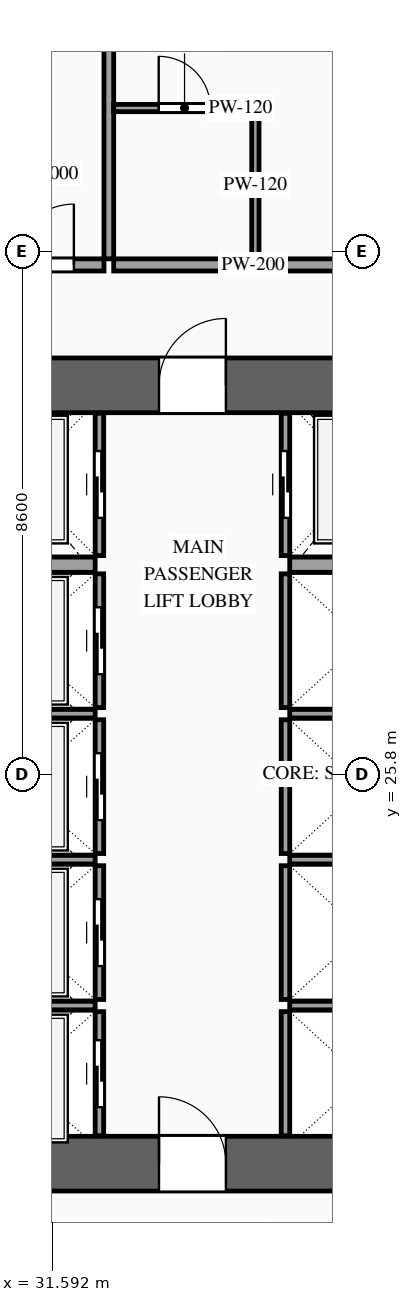
"""IFC4 building model, lengths in metres.
Left out: names, types, materials, properties, quantities, classifications, styles, units other than length and angle.
Written with IfcOpenShell. Run it as: python <this file> out.ifc"""

import sys

from ifc_helpers import new_model, si_unit, direction, frame, frame_2d, origin, place, context, subcontext, project, spatial, rectangle, extrude, source, transform, mapped, element, fill, save


model = new_model("IFC4")
c1 = context("Model", 3, precision=1e-05, world=origin(), true_north=direction((0.0, 1.0)))
c2 = subcontext(c1, "Body", "Model", "MODEL_VIEW")
j1 = project(units=[si_unit("LENGTHUNIT", "METRE"), si_unit("PLANEANGLEUNIT", "RADIAN")], contexts=[c1])
p1 = place(None, origin())
s1 = spatial("IfcSite", under=j1, at=p1, CompositionType="ELEMENT")
p2 = place(p1, origin())
s2 = spatial("IfcBuilding", under=s1, at=p2, CompositionType="ELEMENT")
p3 = place(p2, frame((0.0, 0.0, 46.0)))
s3 = spatial("IfcBuildingStorey", under=s2, at=p3, CompositionType="ELEMENT", Elevation=46.0)
p4 = place(p3, frame((23.35, 19.4, 0.0), z_axis=(0.0, 0.0, 1.0), x_axis=(1.0, 0.0, 0.0)))
e1 = element("IfcWall", 1, at=p4, inside=s3, PredefinedType="SHEAR", context=c2, shape_type="SweptSolid", body=[
    extrude(rectangle(XDim=27.3, YDim=0.9, at=frame_2d((13.65, 0.0))), origin(), (0.0, 0.0, 1.0), 3.6),
])
p5 = place(p4, frame((2.1, 0.0, 0.0)))
e2 = element("IfcOpeningElement", 2, at=p5, cuts=e1, PredefinedType="OPENING", context=c2, shape_type="SweptSolid", body=[
    extrude(rectangle(XDim=1.1, YDim=2.2, at=frame_2d((0.55, 1.1))), frame((0.0, 0.465, 0.0), z_axis=(0.0, -1.0, 0.0), x_axis=(1.0, 0.0, 0.0)), (0.0, 0.0, 1.0), 0.93),
])
p6 = place(p4, frame((10.0, 0.0, 0.0)))
e3 = element("IfcOpeningElement", 3, at=p6, cuts=e1, PredefinedType="OPENING", context=c2, shape_type="SweptSolid", body=[
    extrude(rectangle(XDim=1.1, YDim=2.2, at=frame_2d((0.55, 1.1))), frame((0.0, 0.465, 0.0), z_axis=(0.0, -1.0, 0.0), x_axis=(1.0, 0.0, 0.0)), (0.0, 0.0, 1.0), 0.93),
])
p7 = place(p4, frame((23.2, 0.0, 0.0)))
e4 = element("IfcOpeningElement", 4, at=p7, cuts=e1, PredefinedType="OPENING", context=c2, shape_type="SweptSolid", body=[
    extrude(rectangle(XDim=1.1, YDim=2.2, at=frame_2d((0.55, 1.1))), frame((0.0, 0.465, 0.0), z_axis=(0.0, -1.0, 0.0), x_axis=(1.0, 0.0, 0.0)), (0.0, 0.0, 1.0), 0.93),
])
p8 = place(p4, frame((19.82, 0.0, 0.0)))
e5 = element("IfcOpeningElement", 5, at=p8, cuts=e1, PredefinedType="OPENING", context=c2, shape_type="SweptSolid", body=[
    extrude(rectangle(XDim=0.9, YDim=2.15, at=frame_2d((0.45, 1.075))), frame((0.0, 0.465, 0.0), z_axis=(0.0, -1.0, 0.0), x_axis=(1.0, 0.0, 0.0)), (0.0, 0.0, 1.0), 0.93),
])
p9 = place(p4, frame((18.38, 0.0, 0.0)))
e6 = element("IfcOpeningElement", 6, at=p9, cuts=e1, PredefinedType="OPENING", context=c2, shape_type="SweptSolid", body=[
    extrude(rectangle(XDim=0.9, YDim=2.15, at=frame_2d((0.45, 1.075))), frame((0.0, 0.465, 0.0), z_axis=(0.0, -1.0, 0.0), x_axis=(1.0, 0.0, 0.0)), (0.0, 0.0, 1.0), 0.93),
])
p10 = place(p3, frame((23.35, 32.2, 0.0), z_axis=(0.0, 0.0, 1.0), x_axis=(1.0, 0.0, 0.0)))
e7 = element("IfcWall", 7, at=p10, inside=s3, PredefinedType="SHEAR", context=c2, shape_type="SweptSolid", body=[
    extrude(rectangle(XDim=27.3, YDim=0.9, at=frame_2d((13.65, 0.0))), origin(), (0.0, 0.0, 1.0), 3.6),
])
p11 = place(p10, frame((4.72, 0.0, 0.0)))
e8 = element("IfcOpeningElement", 8, at=p11, cuts=e7, PredefinedType="OPENING", context=c2, shape_type="SweptSolid", body=[
    extrude(rectangle(XDim=0.9, YDim=2.15, at=frame_2d((0.45, 1.075))), frame((0.0, 0.465, 0.0), z_axis=(0.0, -1.0, 0.0), x_axis=(1.0, 0.0, 0.0)), (0.0, 0.0, 1.0), 0.93),
])
p12 = place(p10, frame((10.0, 0.0, 0.0)))
e9 = element("IfcOpeningElement", 9, at=p12, cuts=e7, PredefinedType="OPENING", context=c2, shape_type="SweptSolid", body=[
    extrude(rectangle(XDim=1.1, YDim=2.2, at=frame_2d((0.55, 1.1))), frame((0.0, 0.465, 0.0), z_axis=(0.0, -1.0, 0.0), x_axis=(1.0, 0.0, 0.0)), (0.0, 0.0, 1.0), 0.93),
])
p13 = place(p10, frame((15.85, 0.0, 0.0)))
e10 = element("IfcOpeningElement", 10, at=p13, cuts=e7, PredefinedType="OPENING", context=c2, shape_type="SweptSolid", body=[
    extrude(rectangle(XDim=1.1, YDim=2.2, at=frame_2d((0.55, 1.1))), frame((0.0, 0.465, 0.0), z_axis=(0.0, -1.0, 0.0), x_axis=(1.0, 0.0, 0.0)), (0.0, 0.0, 1.0), 0.93),
])
p14 = place(p10, frame((19.05, 0.0, 0.0)))
e11 = element("IfcOpeningElement", 11, at=p14, cuts=e7, PredefinedType="OPENING", context=c2, shape_type="SweptSolid", body=[
    extrude(rectangle(XDim=0.9, YDim=2.15, at=frame_2d((0.45, 1.075))), frame((0.0, 0.465, 0.0), z_axis=(0.0, -1.0, 0.0), x_axis=(1.0, 0.0, 0.0)), (0.0, 0.0, 1.0), 0.93),
])
p15 = place(p3, frame((32.37, 19.86, 0.0), z_axis=(0.0, 0.0, 1.0), x_axis=(0.0, 1.0, 0.0)))
e12 = element("IfcWall", 12, at=p15, inside=s3, PredefinedType="SOLIDWALL", context=c2, shape_type="SweptSolid", body=[
    extrude(rectangle(XDim=2.04, YDim=0.14, at=frame_2d((1.02, 0.0))), origin(), (0.0, 0.0, 1.0), 3.38),
])
p16 = place(p15, frame((0.47, 0.0, 0.0)))
e13 = element("IfcOpeningElement", 13, at=p16, cuts=e12, PredefinedType="OPENING", context=c2, shape_type="SweptSolid", body=[
    extrude(rectangle(XDim=1.1, YDim=2.2, at=frame_2d((0.55, 1.1))), frame((0.0, 0.085, 0.0), z_axis=(0.0, -1.0, 0.0), x_axis=(1.0, 0.0, 0.0)), (0.0, 0.0, 1.0), 0.17),
])
m1 = source(origin(), c2, "Body", "SweptSolid", [
    extrude(rectangle(XDim=2.5, YDim=0.14, at=frame_2d((1.25, 0.0))), origin(), (0.0, 0.0, 1.0), 3.38),
])
p17 = place(p3, frame((29.8, 22.0, 0.0), z_axis=(0.0, 0.0, 1.0), x_axis=(1.0, 0.0, 0.0)))
e14 = element("IfcWall", 14, at=p17, inside=s3, PredefinedType="SOLIDWALL", context=c2, shape_type="MappedRepresentation", body=[
    mapped(m1, transform((0.0, 0.0, 0.0), scale=1.0)),
])
p18 = place(p3, frame((32.37, 22.1, 0.0), z_axis=(0.0, 0.0, 1.0), x_axis=(0.0, 1.0, 0.0)))
e15 = element("IfcWall", 15, at=p18, inside=s3, PredefinedType="SOLIDWALL", context=c2, shape_type="SweptSolid", body=[
    extrude(rectangle(XDim=2.2, YDim=0.14, at=frame_2d((1.1, 0.0))), origin(), (0.0, 0.0, 1.0), 3.38),
])
p19 = place(p18, frame((0.55, 0.0, 0.0)))
e16 = element("IfcOpeningElement", 16, at=p19, cuts=e15, PredefinedType="OPENING", context=c2, shape_type="SweptSolid", body=[
    extrude(rectangle(XDim=1.1, YDim=2.2, at=frame_2d((0.55, 1.1))), frame((0.0, 0.085, 0.0), z_axis=(0.0, -1.0, 0.0), x_axis=(1.0, 0.0, 0.0)), (0.0, 0.0, 1.0), 0.17),
])
p20 = place(p3, frame((29.8, 24.4, 0.0), z_axis=(0.0, 0.0, 1.0), x_axis=(1.0, 0.0, 0.0)))
e17 = element("IfcWall", 17, at=p20, inside=s3, PredefinedType="SOLIDWALL", context=c2, shape_type="MappedRepresentation", body=[
    mapped(m1, transform((0.0, 0.0, 0.0), scale=1.0)),
])
p21 = place(p3, frame((32.37, 24.5, 0.0), z_axis=(0.0, 0.0, 1.0), x_axis=(0.0, 1.0, 0.0)))
e18 = element("IfcWall", 18, at=p21, inside=s3, PredefinedType="SOLIDWALL", context=c2, shape_type="SweptSolid", body=[
    extrude(rectangle(XDim=2.2, YDim=0.14, at=frame_2d((1.1, 0.0))), origin(), (0.0, 0.0, 1.0), 3.38),
])
p22 = place(p21, frame((0.55, 0.0, 0.0)))
e19 = element("IfcOpeningElement", 19, at=p22, cuts=e18, PredefinedType="OPENING", context=c2, shape_type="SweptSolid", body=[
    extrude(rectangle(XDim=1.1, YDim=2.2, at=frame_2d((0.55, 1.1))), frame((0.0, 0.085, 0.0), z_axis=(0.0, -1.0, 0.0), x_axis=(1.0, 0.0, 0.0)), (0.0, 0.0, 1.0), 0.17),
])
p23 = place(p3, frame((29.8, 26.8, 0.0), z_axis=(0.0, 0.0, 1.0), x_axis=(1.0, 0.0, 0.0)))
e20 = element("IfcWall", 20, at=p23, inside=s3, PredefinedType="SOLIDWALL", context=c2, shape_type="MappedRepresentation", body=[
    mapped(m1, transform((0.0, 0.0, 0.0), scale=1.0)),
])
p24 = place(p3, frame((32.37, 26.9, 0.0), z_axis=(0.0, 0.0, 1.0), x_axis=(0.0, 1.0, 0.0)))
e21 = element("IfcWall", 21, at=p24, inside=s3, PredefinedType="SOLIDWALL", context=c2, shape_type="SweptSolid", body=[
    extrude(rectangle(XDim=2.2, YDim=0.14, at=frame_2d((1.1, 0.0))), origin(), (0.0, 0.0, 1.0), 3.38),
])
p25 = place(p24, frame((0.55, 0.0, 0.0)))
e22 = element("IfcOpeningElement", 22, at=p25, cuts=e21, PredefinedType="OPENING", context=c2, shape_type="SweptSolid", body=[
    extrude(rectangle(XDim=1.1, YDim=2.2, at=frame_2d((0.55, 1.1))), frame((0.0, 0.085, 0.0), z_axis=(0.0, -1.0, 0.0), x_axis=(1.0, 0.0, 0.0)), (0.0, 0.0, 1.0), 0.17),
])
p26 = place(p3, frame((32.37, 29.4, 0.0), z_axis=(0.0, 0.0, 1.0), x_axis=(0.0, 1.0, 0.0)))
e23 = element("IfcWall", 23, at=p26, inside=s3, PredefinedType="SOLIDWALL", context=c2, shape_type="SweptSolid", body=[
    extrude(rectangle(XDim=2.34, YDim=0.14, at=frame_2d((1.17, 0.0))), origin(), (0.0, 0.0, 1.0), 3.38),
])
p27 = place(p26, frame((0.62, 0.0, 0.0)))
e24 = element("IfcOpeningElement", 24, at=p27, cuts=e23, PredefinedType="OPENING", context=c2, shape_type="SweptSolid", body=[
    extrude(rectangle(XDim=1.1, YDim=2.2, at=frame_2d((0.55, 1.1))), frame((0.0, 0.085, 0.0), z_axis=(0.0, -1.0, 0.0), x_axis=(1.0, 0.0, 0.0)), (0.0, 0.0, 1.0), 0.17),
])
m2 = source(origin(), c2, "Body", "SweptSolid", [
    extrude(rectangle(XDim=2.5, YDim=0.25, at=frame_2d((1.25, 0.0))), origin(), (0.0, 0.0, 1.0), 3.38),
])
p28 = place(p3, frame((29.8, 29.25, 0.0), z_axis=(0.0, 0.0, 1.0), x_axis=(1.0, 0.0, 0.0)))
e25 = element("IfcWall", 25, at=p28, inside=s3, PredefinedType="SOLIDWALL", context=c2, shape_type="MappedRepresentation", body=[
    mapped(m2, transform((0.0, 0.0, 0.0), scale=1.0)),
])
m3 = source(origin(), c2, "Body", "SweptSolid", [
    extrude(rectangle(XDim=2.04, YDim=0.14, at=frame_2d((1.02, 0.0))), origin(), (0.0, 0.0, 1.0), 3.38),
])
p29 = place(p3, frame((35.43, 19.86, 0.0), z_axis=(0.0, 0.0, 1.0), x_axis=(0.0, 1.0, 0.0)))
e26 = element("IfcWall", 26, at=p29, inside=s3, PredefinedType="SOLIDWALL", context=c2, shape_type="MappedRepresentation", body=[
    mapped(m3, transform((0.0, 0.0, 0.0), scale=1.0)),
])
m4 = source(origin(), c2, "Body", "SweptSolid", [
    extrude(rectangle(XDim=2.4, YDim=0.14, at=frame_2d((1.2, 0.0))), origin(), (0.0, 0.0, 1.0), 3.38),
])
p30 = place(p3, frame((35.5, 22.0, 0.0), z_axis=(0.0, 0.0, 1.0), x_axis=(1.0, 0.0, 0.0)))
e27 = element("IfcWall", 27, at=p30, inside=s3, PredefinedType="SOLIDWALL", context=c2, shape_type="MappedRepresentation", body=[
    mapped(m4, transform((0.0, 0.0, 0.0), scale=1.0)),
])
m5 = source(origin(), c2, "Body", "SweptSolid", [
    extrude(rectangle(XDim=2.2, YDim=0.14, at=frame_2d((1.1, 0.0))), origin(), (0.0, 0.0, 1.0), 3.38),
])
p31 = place(p3, frame((35.43, 22.1, 0.0), z_axis=(0.0, 0.0, 1.0), x_axis=(0.0, 1.0, 0.0)))
e28 = element("IfcWall", 28, at=p31, inside=s3, PredefinedType="SOLIDWALL", context=c2, shape_type="MappedRepresentation", body=[
    mapped(m5, transform((0.0, 0.0, 0.0), scale=1.0)),
])
p32 = place(p3, frame((35.5, 24.4, 0.0), z_axis=(0.0, 0.0, 1.0), x_axis=(1.0, 0.0, 0.0)))
e29 = element("IfcWall", 29, at=p32, inside=s3, PredefinedType="SOLIDWALL", context=c2, shape_type="MappedRepresentation", body=[
    mapped(m4, transform((0.0, 0.0, 0.0), scale=1.0)),
])
p33 = place(p3, frame((35.43, 24.5, 0.0), z_axis=(0.0, 0.0, 1.0), x_axis=(0.0, 1.0, 0.0)))
e30 = element("IfcWall", 30, at=p33, inside=s3, PredefinedType="SOLIDWALL", context=c2, shape_type="MappedRepresentation", body=[
    mapped(m5, transform((0.0, 0.0, 0.0), scale=1.0)),
])
p34 = place(p3, frame((35.5, 26.8, 0.0), z_axis=(0.0, 0.0, 1.0), x_axis=(1.0, 0.0, 0.0)))
e31 = element("IfcWall", 31, at=p34, inside=s3, PredefinedType="SOLIDWALL", context=c2, shape_type="MappedRepresentation", body=[
    mapped(m4, transform((0.0, 0.0, 0.0), scale=1.0)),
])
m6 = source(origin(), c2, "Body", "SweptSolid", [
    extrude(rectangle(XDim=2.2, YDim=0.14, at=frame_2d((1.1, 0.0))), origin(), (0.0, 0.0, 1.0), 3.38),
])
p35 = place(p3, frame((35.43, 26.9, 0.0), z_axis=(0.0, 0.0, 1.0), x_axis=(0.0, 1.0, 0.0)))
e32 = element("IfcWall", 32, at=p35, inside=s3, PredefinedType="SOLIDWALL", context=c2, shape_type="MappedRepresentation", body=[
    mapped(m6, transform((0.0, 0.0, 0.0), scale=1.0)),
])
p36 = place(p3, frame((35.43, 29.4, 0.0), z_axis=(0.0, 0.0, 1.0), x_axis=(0.0, 1.0, 0.0)))
e33 = element("IfcWall", 33, at=p36, inside=s3, PredefinedType="SOLIDWALL", context=c2, shape_type="SweptSolid", body=[
    extrude(rectangle(XDim=2.34, YDim=0.14, at=frame_2d((1.17, 0.0))), origin(), (0.0, 0.0, 1.0), 3.38),
])
p37 = place(p36, frame((0.62, 0.0, 0.0)))
e34 = element("IfcOpeningElement", 34, at=p37, cuts=e33, PredefinedType="OPENING", context=c2, shape_type="SweptSolid", body=[
    extrude(rectangle(XDim=1.1, YDim=2.2, at=frame_2d((0.55, 1.1))), frame((0.0, 0.085, 0.0), z_axis=(0.0, -1.0, 0.0), x_axis=(1.0, 0.0, 0.0)), (0.0, 0.0, 1.0), 0.17),
])
m7 = source(origin(), c2, "Body", "SweptSolid", [
    extrude(rectangle(XDim=2.4, YDim=0.25, at=frame_2d((1.2, 0.0))), origin(), (0.0, 0.0, 1.0), 3.38),
])
p38 = place(p3, frame((35.5, 29.25, 0.0), z_axis=(0.0, 0.0, 1.0), x_axis=(1.0, 0.0, 0.0)))
e35 = element("IfcWall", 35, at=p38, inside=s3, PredefinedType="SOLIDWALL", context=c2, shape_type="MappedRepresentation", body=[
    mapped(m7, transform((0.0, 0.0, 0.0), scale=1.0)),
])
p39 = place(p3, frame((28.42, 34.18, 0.0), z_axis=(0.0, 0.0, 1.0), x_axis=(1.0, 0.0, 0.0)))
e36 = element("IfcWall", 36, at=p39, inside=s3, PredefinedType="PARTITIONING", context=c2, shape_type="SweptSolid", body=[
    extrude(rectangle(XDim=4.025, YDim=0.2, at=frame_2d((2.013, 0.0))), origin(), (0.0, 0.0, 1.0), 3.38),
])
p40 = place(p39, frame((2.53, 0.0, 0.0)))
e37 = element("IfcOpeningElement", 37, at=p40, cuts=e36, PredefinedType="OPENING", context=c2, shape_type="SweptSolid", body=[
    extrude(rectangle(XDim=1.0, YDim=2.2, at=frame_2d((0.5, 1.1))), frame((0.0, 0.115, 0.0), z_axis=(0.0, -1.0, 0.0), x_axis=(1.0, 0.0, 0.0)), (0.0, 0.0, 1.0), 0.23),
])
m8 = source(origin(), c2, "Body", "SweptSolid", [
    extrude(rectangle(XDim=16.47, YDim=0.16, at=frame_2d((8.235, 0.0))), origin(), (0.0, 0.0, 1.0), 3.38),
])
p41 = place(p3, frame((32.525, 34.28, 0.0), z_axis=(0.0, 0.0, 1.0), x_axis=(0.0, 1.0, 0.0)))
e38 = element("IfcWall", 38, at=p41, inside=s3, PredefinedType="PARTITIONING", context=c2, shape_type="MappedRepresentation", body=[
    mapped(m8, transform((0.0, 0.0, 0.0), scale=1.0)),
])
p42 = place(p3, frame((32.605, 34.18, 0.0), z_axis=(0.0, 0.0, 1.0), x_axis=(1.0, 0.0, 0.0)))
e39 = element("IfcWall", 39, at=p42, inside=s3, PredefinedType="PARTITIONING", context=c2, shape_type="SweptSolid", body=[
    extrude(rectangle(XDim=8.261, YDim=0.2, at=frame_2d((4.13, 0.0))), origin(), (0.0, 0.0, 1.0), 3.38),
])
p43 = place(p42, frame((4.836, 0.0, 0.0)))
e40 = element("IfcOpeningElement", 40, at=p43, cuts=e39, PredefinedType="OPENING", context=c2, shape_type="SweptSolid", body=[
    extrude(rectangle(XDim=1.0, YDim=2.2, at=frame_2d((0.5, 1.1))), frame((0.0, 0.115, 0.0), z_axis=(0.0, -1.0, 0.0), x_axis=(1.0, 0.0, 0.0)), (0.0, 0.0, 1.0), 0.23),
])
p44 = place(p3, frame((32.605, 36.76, 0.0), z_axis=(0.0, 0.0, 1.0), x_axis=(1.0, 0.0, 0.0)))
e41 = element("IfcWall", 41, at=p44, inside=s3, PredefinedType="PARTITIONING", context=c2, shape_type="SweptSolid", body=[
    extrude(rectangle(XDim=2.33, YDim=0.12, at=frame_2d((1.165, 0.0))), origin(), (0.0, 0.0, 1.0), 3.38),
])
p45 = place(p44, frame((0.74, 0.0, 0.0)))
e42 = element("IfcOpeningElement", 42, at=p45, cuts=e41, PredefinedType="OPENING", context=c2, shape_type="SweptSolid", body=[
    extrude(rectangle(XDim=0.85, YDim=2.1, at=frame_2d((0.425, 1.05))), frame((0.0, 0.075, 0.0), z_axis=(0.0, -1.0, 0.0), x_axis=(1.0, 0.0, 0.0)), (0.0, 0.0, 1.0), 0.15),
])
m9 = source(origin(), c2, "Body", "SweptSolid", [
    extrude(rectangle(XDim=2.42, YDim=0.12, at=frame_2d((1.21, 0.0))), origin(), (0.0, 0.0, 1.0), 3.38),
])
p46 = place(p3, frame((34.935, 34.28, 0.0), z_axis=(0.0, 0.0, 1.0), x_axis=(0.0, 1.0, 0.0)))
e43 = element("IfcWall", 43, at=p46, inside=s3, PredefinedType="PARTITIONING", context=c2, shape_type="MappedRepresentation", body=[
    mapped(m9, transform((0.0, 0.0, 0.0), scale=1.0)),
])
m10 = source(origin(), c2, "Body", "SweptSolid", [
    extrude(rectangle(XDim=1.1, YDim=2.2, at=frame_2d((0.55, 1.1))), frame((0.0, 0.025, 0.0), z_axis=(0.0, -1.0, 0.0), x_axis=(1.0, 0.0, 0.0)), (0.0, 0.0, 1.0), 0.05),
])
p47 = place(p16, origin())
e44 = element("IfcDoor", 44, at=p47, inside=s3, OperationType="SLIDING_TO_LEFT", PredefinedType="DOOR", context=c2, shape_type="MappedRepresentation", body=[
    mapped(m10, transform((0.0, 0.0, 0.0), scale=1.0)),
])
fill(e13, e44)
p48 = place(p19, origin())
e45 = element("IfcDoor", 45, at=p48, inside=s3, OperationType="SLIDING_TO_RIGHT", PredefinedType="DOOR", context=c2, shape_type="MappedRepresentation", body=[
    mapped(m10, transform((0.0, 0.0, 0.0), scale=1.0)),
])
fill(e16, e45)
p49 = place(p22, origin())
e46 = element("IfcDoor", 46, at=p49, inside=s3, OperationType="SLIDING_TO_LEFT", PredefinedType="DOOR", context=c2, shape_type="MappedRepresentation", body=[
    mapped(m10, transform((0.0, 0.0, 0.0), scale=1.0)),
])
fill(e19, e46)
p50 = place(p25, origin())
e47 = element("IfcDoor", 47, at=p50, inside=s3, OperationType="SLIDING_TO_RIGHT", PredefinedType="DOOR", context=c2, shape_type="MappedRepresentation", body=[
    mapped(m10, transform((0.0, 0.0, 0.0), scale=1.0)),
])
fill(e22, e47)
p51 = place(p27, origin())
e48 = element("IfcDoor", 48, at=p51, inside=s3, OperationType="SLIDING_TO_LEFT", PredefinedType="DOOR", context=c2, shape_type="MappedRepresentation", body=[
    mapped(m10, transform((0.0, 0.0, 0.0), scale=1.0)),
])
fill(e24, e48)
p52 = place(p37, origin())
e49 = element("IfcDoor", 49, at=p52, inside=s3, OperationType="SLIDING_TO_RIGHT", PredefinedType="DOOR", context=c2, shape_type="MappedRepresentation", body=[
    mapped(m10, transform((0.0, 0.0, 0.0), scale=1.0)),
])
fill(e34, e49)
m11 = source(origin(), c2, "Body", "SweptSolid", [
    extrude(rectangle(XDim=1.1, YDim=2.2, at=frame_2d((0.55, 1.1))), frame((0.0, 0.025, 0.0), z_axis=(0.0, -1.0, 0.0), x_axis=(1.0, 0.0, 0.0)), (0.0, 0.0, 1.0), 0.05),
])
p53 = place(p6, origin())
e50 = element("IfcDoor", 50, at=p53, inside=s3, OperationType="SINGLE_SWING_LEFT", PredefinedType="DOOR", context=c2, shape_type="MappedRepresentation", body=[
    mapped(m11, transform((0.0, 0.0, 0.0), scale=1.0)),
])
fill(e3, e50)
p54 = place(p12, origin())
e51 = element("IfcDoor", 51, at=p54, inside=s3, OperationType="SINGLE_SWING_RIGHT", PredefinedType="DOOR", context=c2, shape_type="MappedRepresentation", body=[
    mapped(m11, transform((0.0, 0.0, 0.0), scale=1.0)),
])
fill(e9, e51)
m12 = source(origin(), c2, "Body", "SweptSolid", [
    extrude(rectangle(XDim=1.0, YDim=2.2, at=frame_2d((0.5, 1.1))), frame((0.0, 0.025, 0.0), z_axis=(0.0, -1.0, 0.0), x_axis=(1.0, 0.0, 0.0)), (0.0, 0.0, 1.0), 0.05),
])
p55 = place(p40, origin())
e52 = element("IfcDoor", 52, at=p55, inside=s3, OperationType="SINGLE_SWING_RIGHT", PredefinedType="DOOR", context=c2, shape_type="MappedRepresentation", body=[
    mapped(m12, transform((0.0, 0.0, 0.0), scale=1.0)),
])
fill(e37, e52)
m13 = source(origin(), c2, "Body", "SweptSolid", [
    extrude(rectangle(XDim=0.85, YDim=2.1, at=frame_2d((0.425, 1.05))), frame((0.0, 0.025, 0.0), z_axis=(0.0, -1.0, 0.0), x_axis=(1.0, 0.0, 0.0)), (0.0, 0.0, 1.0), 0.05),
])
p56 = place(p45, origin())
e53 = element("IfcDoor", 53, at=p56, inside=s3, OperationType="SINGLE_SWING_LEFT", PredefinedType="DOOR", context=c2, shape_type="MappedRepresentation", body=[
    mapped(m13, transform((0.0, 0.0, 0.0), scale=1.0)),
])
fill(e42, e53)
save(model, sys.argv[1])
